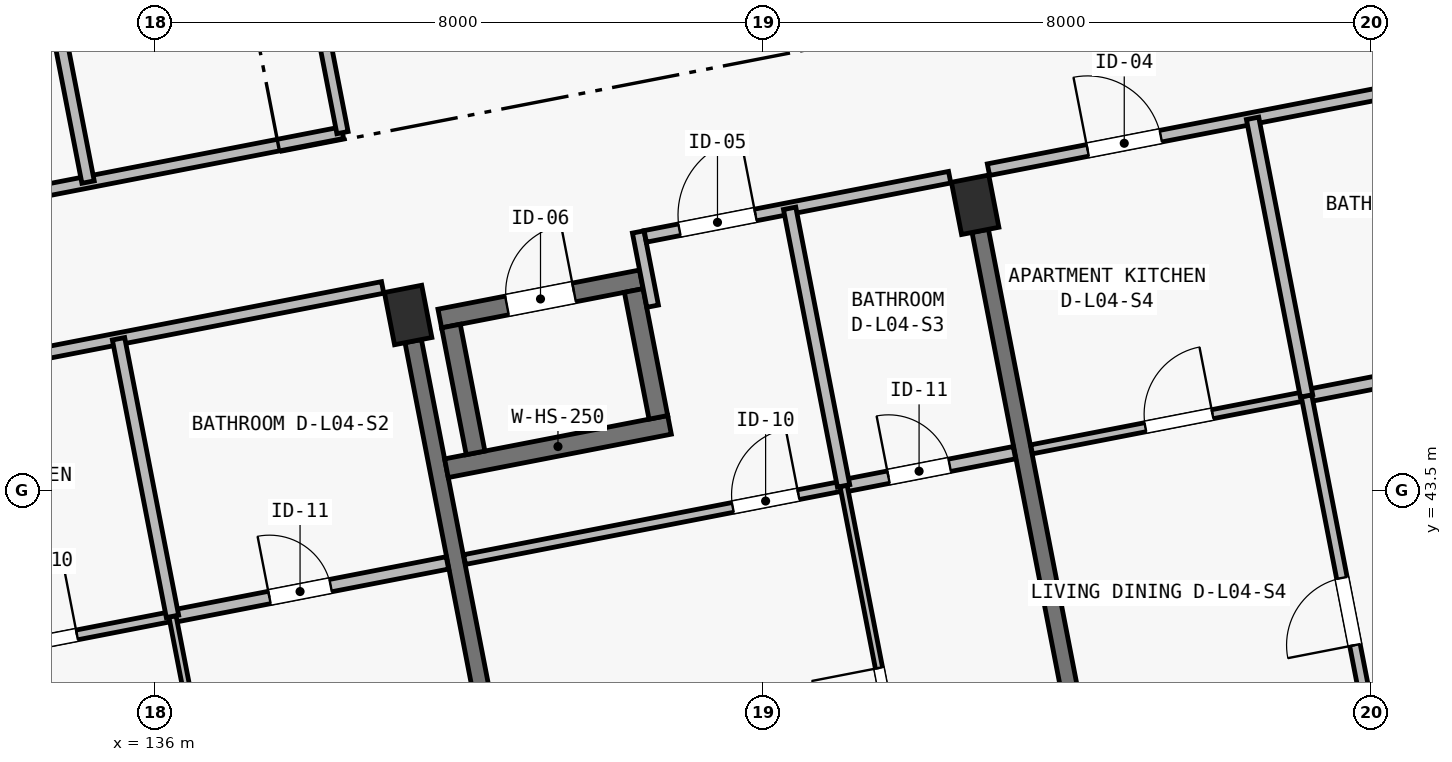
"""IFC4 building model, lengths in metres.
Left out: names, types, materials, properties, quantities, classifications, styles, units other than length and angle.
Written with IfcOpenShell. Run it as: python <this file> out.ifc"""

import sys

from ifc_helpers import new_model, si_unit, direction, frame, frame_2d, origin, origin_2d, place, context, subcontext, project, spatial, rectangle, extrude, element, fill, save


model = new_model("IFC4")
c1 = context("Model", 3, precision=1e-05, world=origin(), true_north=direction((0.0, 1.0)))
c2 = subcontext(c1, "Body", "Model", "MODEL_VIEW")
j1 = project(units=[si_unit("LENGTHUNIT", "METRE"), si_unit("PLANEANGLEUNIT", "RADIAN")], contexts=[c1])
p1 = place(None, origin())
s1 = spatial("IfcSite", under=j1, at=p1, CompositionType="ELEMENT")
p2 = place(p1, origin())
s2 = spatial("IfcBuilding", under=s1, at=p2, CompositionType="ELEMENT")
p3 = place(p2, frame((0.0, 0.0, 14.9)))
s3 = spatial("IfcBuildingStorey", under=s2, at=p3, CompositionType="ELEMENT", Elevation=14.9)
for number, where, z_axis, x_axis in (
    (1, (139.331, 45.811, 0.0), (0.0, 0.0, 1.0), (0.982, 0.191, 0.0)),
    (2, (146.791, 47.261, 0.0), (0.0, 0.0, 1.0), (0.982, 0.191, 0.0)),
):
    element("IfcColumn", number, at=place(p3, frame(where, z_axis=z_axis, x_axis=x_axis)), inside=s3, PredefinedType="COLUMN", context=c2, shape_type="SweptSolid", body=[
        extrude(rectangle(XDim=0.5, YDim=0.7, at=origin_2d()), origin(), (0.0, 0.0, 1.0), 3.25),
    ])
p4 = place(p3, frame((140.714, 38.694, 0.0), z_axis=(0.0, 0.0, 1.0), x_axis=(-0.190819465253, 0.981625148252, 0.0)))
e3 = element("IfcWall", 3, at=p4, inside=s3, PredefinedType="SHEAR", context=c2, shape_type="SweptSolid", body=[
    extrude(rectangle(XDim=6.9, YDim=0.22, at=frame_2d((3.45, 0.0))), origin(), (0.0, 0.0, 1.0), 2.5),
])
p5 = place(p3, frame((148.175, 40.144, 0.0), z_axis=(0.0, 0.0, 1.0), x_axis=(-0.190812837813, 0.981626436546, 0.0)))
e4 = element("IfcWall", 4, at=p5, inside=s3, PredefinedType="SHEAR", context=c2, shape_type="SweptSolid", body=[
    extrude(rectangle(XDim=6.9, YDim=0.22, at=frame_2d((3.45, 0.0))), origin(), (0.0, 0.0, 1.0), 2.5),
])
p6 = place(p3, frame((139.835, 43.795, 0.0), z_axis=(0.0, 0.0, 1.0), x_axis=(0.981624737535, 0.190821578075, 0.0)))
e5 = element("IfcWall", 5, at=p6, inside=s3, PredefinedType="SHEAR", context=c2, shape_type="SweptSolid", body=[
    extrude(rectangle(XDim=2.99, YDim=0.25, at=frame_2d((1.495, 0.0))), origin(), (0.0, 0.0, 1.0), 3.25),
])
p7 = place(p3, frame((139.748, 45.764, 0.0), z_axis=(0.0, 0.0, 1.0), x_axis=(0.981630445883, 0.190792210834, 0.0)))
e6 = element("IfcWall", 6, at=p7, inside=s3, PredefinedType="SHEAR", context=c2, shape_type="SweptSolid", body=[
    extrude(rectangle(XDim=2.7, YDim=0.25, at=frame_2d((1.35, 0.0))), origin(), (0.0, 0.0, 1.0), 3.25),
])
p8 = place(p7, frame((0.9, 0.0, 0.0)))
e7 = element("IfcOpeningElement", 7, at=p8, cuts=e6, PredefinedType="OPENING", context=c2, shape_type="SweptSolid", body=[
    extrude(rectangle(XDim=0.9, YDim=2.05, at=frame_2d((0.45, 1.025))), frame((0.0, 0.14, 0.0), z_axis=(0.0, -1.0, 0.0), x_axis=(1.0, 0.0, 0.0)), (0.0, 0.0, 1.0), 0.28),
])
for number, where, z_axis, x_axis in (
    (8, (140.218, 43.997, 0.0), (0.0, 0.0, 1.0), (-0.191, 0.982, 0.0)),
    (9, (142.623, 44.464, 0.0), (0.0, 0.0, 1.0), (-0.191, 0.982, 0.0)),
):
    element("IfcWall", number, at=place(p3, frame(where, z_axis=z_axis, x_axis=x_axis)), inside=s3, PredefinedType="SHEAR", context=c2, shape_type="SweptSolid", body=[
        extrude(rectangle(XDim=1.7, YDim=0.25, at=frame_2d((0.85, 0.0))), origin(), (0.0, 0.0, 1.0), 3.25),
    ])
p9 = place(p3, frame((132.046, 44.823, 0.0), z_axis=(0.0, 0.0, 1.0), x_axis=(0.9816234647, 0.190828125677, 0.0)))
e10 = element("IfcWall", 10, at=p9, inside=s3, PredefinedType="PARTITIONING", context=c2, shape_type="SweptSolid", body=[
    extrude(rectangle(XDim=7.08, YDim=0.155, at=frame_2d((3.54, 0.0))), origin(), (0.0, 0.0, 1.0), 2.97),
])
p10 = place(p9, frame((1.33, 0.0, 0.0)))
e11 = element("IfcOpeningElement", 11, at=p10, cuts=e10, PredefinedType="OPENING", context=c2, shape_type="SweptSolid", body=[
    extrude(rectangle(XDim=1.02, YDim=2.2, at=frame_2d((0.51, 1.1))), frame((0.0, 0.093, 0.0), z_axis=(0.0, -1.0, 0.0), x_axis=(1.0, 0.0, 0.0)), (0.0, 0.0, 1.0), 0.185),
])
p11 = place(p3, frame((132.613, 41.143, 0.0), z_axis=(0.0, 0.0, 1.0), x_axis=(0.981628834294, 0.190800502313, 0.0)))
e12 = element("IfcWall", 12, at=p11, inside=s3, PredefinedType="PARTITIONING", context=c2, shape_type="SweptSolid", body=[
    extrude(rectangle(XDim=3.685, YDim=0.13, at=frame_2d((1.843, 0.0))), origin(), (0.0, 0.0, 1.0), 2.97),
])
p12 = place(p11, frame((1.525, 0.0, 0.0)))
e13 = element("IfcOpeningElement", 13, at=p12, cuts=e12, PredefinedType="OPENING", context=c2, shape_type="SweptSolid", body=[
    extrude(rectangle(XDim=0.88, YDim=2.1, at=frame_2d((0.44, 1.05))), frame((0.0, 0.08, 0.0), z_axis=(0.0, -1.0, 0.0), x_axis=(1.0, 0.0, 0.0)), (0.0, 0.0, 1.0), 0.16),
])
p13 = place(p3, frame((136.23, 41.846, 0.0), z_axis=(0.0, 0.0, 1.0), x_axis=(0.981626422232, 0.190812911449, 0.0)))
e14 = element("IfcWall", 14, at=p13, inside=s3, PredefinedType="PLUMBINGWALL", context=c2, shape_type="SweptSolid", body=[
    extrude(rectangle(XDim=3.685, YDim=0.165, at=frame_2d((1.842, 0.0))), origin(), (0.0, 0.0, 1.0), 2.97),
])
p14 = place(p13, frame((1.3, 0.0, 0.0)))
e15 = element("IfcOpeningElement", 15, at=p14, cuts=e14, PredefinedType="OPENING", context=c2, shape_type="SweptSolid", body=[
    extrude(rectangle(XDim=0.82, YDim=2.08, at=frame_2d((0.41, 1.04))), frame((0.0, 0.097, 0.0), z_axis=(0.0, -1.0, 0.0), x_axis=(1.0, 0.0, 0.0)), (0.0, 0.0, 1.0), 0.195),
])
p15 = place(p3, frame((137.125, 37.242, 0.0), z_axis=(0.0, 0.0, 1.0), x_axis=(-0.190777702748, 0.981633265601, 0.0)))
e16 = element("IfcWall", 16, at=p15, inside=s3, PredefinedType="PARTITIONING", context=c2, shape_type="SweptSolid", body=[
    extrude(rectangle(XDim=4.69, YDim=0.095, at=frame_2d((2.345, 0.0))), origin(), (0.0, 0.0, 1.0), 2.97),
])
p16 = place(p15, frame((1.35, 0.0, 0.0)))
e17 = element("IfcOpeningElement", 17, at=p16, cuts=e16, PredefinedType="OPENING", context=c2, shape_type="SweptSolid", body=[
    extrude(rectangle(XDim=0.9, YDim=2.1, at=frame_2d((0.45, 1.05))), frame((0.0, 0.062, 0.0), z_axis=(0.0, -1.0, 0.0), x_axis=(1.0, 0.0, 0.0)), (0.0, 0.0, 1.0), 0.125),
])
p17 = place(p3, frame((136.23, 41.846, 0.0), z_axis=(0.0, 0.0, 1.0), x_axis=(-0.190850336204, 0.981619146701, 0.0)))
e18 = element("IfcWall", 18, at=p17, inside=s3, PredefinedType="PLUMBINGWALL", context=c2, shape_type="SweptSolid", body=[
    extrude(rectangle(XDim=3.72, YDim=0.165, at=frame_2d((1.86, 0.0))), origin(), (0.0, 0.0, 1.0), 2.97),
])
p18 = place(p3, frame((142.548, 45.927, 0.0), z_axis=(0.0, 0.0, 1.0), x_axis=(-0.190639805817, 0.981660055436, 0.0)))
e19 = element("IfcWall", 19, at=p18, inside=s3, PredefinedType="PARTITIONING", context=c2, shape_type="SweptSolid", body=[
    extrude(rectangle(XDim=0.995, YDim=0.155, at=frame_2d((0.498, 0.0))), origin(), (0.0, 0.0, 1.0), 2.97),
])
p19 = place(p3, frame((142.451, 46.845, 0.0), z_axis=(0.0, 0.0, 1.0), x_axis=(0.981636249117, 0.190762350636, 0.0)))
e20 = element("IfcWall", 20, at=p19, inside=s3, PredefinedType="PARTITIONING", context=c2, shape_type="SweptSolid", body=[
    extrude(rectangle(XDim=4.08, YDim=0.155, at=frame_2d((2.04, 0.0))), origin(), (0.0, 0.0, 1.0), 2.97),
])
p20 = place(p19, frame((0.458, 0.0, 0.0)))
e21 = element("IfcOpeningElement", 21, at=p20, cuts=e20, PredefinedType="OPENING", context=c2, shape_type="SweptSolid", body=[
    extrude(rectangle(XDim=1.02, YDim=2.2, at=frame_2d((0.51, 1.1))), frame((0.0, 0.093, 0.0), z_axis=(0.0, -1.0, 0.0), x_axis=(1.0, 0.0, 0.0)), (0.0, 0.0, 1.0), 0.185),
])
p21 = place(p3, frame((140.073, 42.594, 0.0), z_axis=(0.0, 0.0, 1.0), x_axis=(0.981629144122, 0.190798908307, 0.0)))
e22 = element("IfcWall", 22, at=p21, inside=s3, PredefinedType="PARTITIONING", context=c2, shape_type="SweptSolid", body=[
    extrude(rectangle(XDim=5.08, YDim=0.13, at=frame_2d((2.54, 0.0))), origin(), (0.0, 0.0, 1.0), 2.97),
])
p22 = place(p21, frame((3.595, 0.0, 0.0)))
e23 = element("IfcOpeningElement", 23, at=p22, cuts=e22, PredefinedType="OPENING", context=c2, shape_type="SweptSolid", body=[
    extrude(rectangle(XDim=0.88, YDim=2.1, at=frame_2d((0.44, 1.05))), frame((0.0, 0.08, 0.0), z_axis=(0.0, -1.0, 0.0), x_axis=(1.0, 0.0, 0.0)), (0.0, 0.0, 1.0), 0.16),
])
p23 = place(p3, frame((145.06, 43.563, 0.0), z_axis=(0.0, 0.0, 1.0), x_axis=(0.981624265801, 0.190824004755, 0.0)))
e24 = element("IfcWall", 24, at=p23, inside=s3, PredefinedType="PLUMBINGWALL", context=c2, shape_type="SweptSolid", body=[
    extrude(rectangle(XDim=2.29, YDim=0.165, at=frame_2d((1.145, 0.0))), origin(), (0.0, 0.0, 1.0), 2.97),
])
p24 = place(p23, frame((0.602, 0.0, 0.0)))
e25 = element("IfcOpeningElement", 25, at=p24, cuts=e24, PredefinedType="OPENING", context=c2, shape_type="SweptSolid", body=[
    extrude(rectangle(XDim=0.82, YDim=2.08, at=frame_2d((0.41, 1.04))), frame((0.0, 0.097, 0.0), z_axis=(0.0, -1.0, 0.0), x_axis=(1.0, 0.0, 0.0)), (0.0, 0.0, 1.0), 0.195),
])
p25 = place(p3, frame((145.955, 38.959, 0.0), z_axis=(0.0, 0.0, 1.0), x_axis=(-0.190837612577, 0.981621620394, 0.0)))
e26 = element("IfcWall", 26, at=p25, inside=s3, PredefinedType="PARTITIONING", context=c2, shape_type="SweptSolid", body=[
    extrude(rectangle(XDim=4.69, YDim=0.095, at=frame_2d((2.345, 0.0))), origin(), (0.0, 0.0, 1.0), 2.97),
])
p26 = place(p25, frame((1.35, 0.0, 0.0)))
e27 = element("IfcOpeningElement", 27, at=p26, cuts=e26, PredefinedType="OPENING", context=c2, shape_type="SweptSolid", body=[
    extrude(rectangle(XDim=0.9, YDim=2.1, at=frame_2d((0.45, 1.05))), frame((0.0, 0.062, 0.0), z_axis=(0.0, -1.0, 0.0), x_axis=(1.0, 0.0, 0.0)), (0.0, 0.0, 1.0), 0.125),
])
p27 = place(p3, frame((145.06, 43.563, 0.0), z_axis=(0.0, 0.0, 1.0), x_axis=(-0.190787096078, 0.981631439987, 0.0)))
e28 = element("IfcWall", 28, at=p27, inside=s3, PredefinedType="PLUMBINGWALL", context=c2, shape_type="SweptSolid", body=[
    extrude(rectangle(XDim=3.72, YDim=0.165, at=frame_2d((1.86, 0.0))), origin(), (0.0, 0.0, 1.0), 2.97),
])
p28 = place(p3, frame((146.966, 47.723, 0.0), z_axis=(0.0, 0.0, 1.0), x_axis=(0.981629923556, 0.190794898199, 0.0)))
e29 = element("IfcWall", 29, at=p28, inside=s3, PredefinedType="PARTITIONING", context=c2, shape_type="SweptSolid", body=[
    extrude(rectangle(XDim=7.08, YDim=0.155, at=frame_2d((3.54, 0.0))), origin(), (0.0, 0.0, 1.0), 2.97),
])
p29 = place(p28, frame((1.33, 0.0, 0.0)))
e30 = element("IfcOpeningElement", 30, at=p29, cuts=e29, PredefinedType="OPENING", context=c2, shape_type="SweptSolid", body=[
    extrude(rectangle(XDim=0.98, YDim=2.15, at=frame_2d((0.49, 1.075))), frame((0.0, 0.093, 0.0), z_axis=(0.0, -1.0, 0.0), x_axis=(1.0, 0.0, 0.0)), (0.0, 0.0, 1.0), 0.185),
])
p30 = place(p3, frame((147.534, 44.043, 0.0), z_axis=(0.0, 0.0, 1.0), x_axis=(0.981626422232, 0.190812911449, 0.0)))
e31 = element("IfcWall", 31, at=p30, inside=s3, PredefinedType="PARTITIONING", context=c2, shape_type="SweptSolid", body=[
    extrude(rectangle(XDim=3.685, YDim=0.12, at=frame_2d((1.842, 0.0))), origin(), (0.0, 0.0, 1.0), 2.97),
])
p31 = place(p30, frame((1.525, 0.0, 0.0)))
e32 = element("IfcOpeningElement", 32, at=p31, cuts=e31, PredefinedType="OPENING", context=c2, shape_type="SweptSolid", body=[
    extrude(rectangle(XDim=0.9, YDim=2.1, at=frame_2d((0.45, 1.05))), frame((0.0, 0.075, 0.0), z_axis=(0.0, -1.0, 0.0), x_axis=(1.0, 0.0, 0.0)), (0.0, 0.0, 1.0), 0.15),
])
p32 = place(p3, frame((151.151, 44.747, 0.0), z_axis=(0.0, 0.0, 1.0), x_axis=(0.981628834294, 0.190800502313, 0.0)))
e33 = element("IfcWall", 33, at=p32, inside=s3, PredefinedType="PLUMBINGWALL", context=c2, shape_type="SweptSolid", body=[
    extrude(rectangle(XDim=3.685, YDim=0.165, at=frame_2d((1.843, 0.0))), origin(), (0.0, 0.0, 1.0), 2.97),
])
p33 = place(p32, frame((1.3, 0.0, 0.0)))
e34 = element("IfcOpeningElement", 34, at=p33, cuts=e33, PredefinedType="OPENING", context=c2, shape_type="SweptSolid", body=[
    extrude(rectangle(XDim=0.82, YDim=2.08, at=frame_2d((0.41, 1.04))), frame((0.0, 0.097, 0.0), z_axis=(0.0, -1.0, 0.0), x_axis=(1.0, 0.0, 0.0)), (0.0, 0.0, 1.0), 0.195),
])
p34 = place(p3, frame((152.046, 40.143, 0.0), z_axis=(0.0, 0.0, 1.0), x_axis=(-0.190837612577, 0.981621620394, 0.0)))
e35 = element("IfcWall", 35, at=p34, inside=s3, PredefinedType="PARTITIONING", context=c2, shape_type="SweptSolid", body=[
    extrude(rectangle(XDim=4.69, YDim=0.14, at=frame_2d((2.345, 0.0))), origin(), (0.0, 0.0, 1.0), 2.97),
])
p35 = place(p34, frame((1.35, 0.0, 0.0)))
e36 = element("IfcOpeningElement", 36, at=p35, cuts=e35, PredefinedType="OPENING", context=c2, shape_type="SweptSolid", body=[
    extrude(rectangle(XDim=0.9, YDim=2.1, at=frame_2d((0.45, 1.05))), frame((0.0, 0.085, 0.0), z_axis=(0.0, -1.0, 0.0), x_axis=(1.0, 0.0, 0.0)), (0.0, 0.0, 1.0), 0.17),
])
p36 = place(p3, frame((151.151, 44.747, 0.0), z_axis=(0.0, 0.0, 1.0), x_axis=(-0.190774805453, 0.981633828678, 0.0)))
e37 = element("IfcWall", 37, at=p36, inside=s3, PredefinedType="PLUMBINGWALL", context=c2, shape_type="SweptSolid", body=[
    extrude(rectangle(XDim=3.72, YDim=0.165, at=frame_2d((1.86, 0.0))), origin(), (0.0, 0.0, 1.0), 2.97),
])
p37 = place(p3, frame((131.772, 46.909, 0.0), z_axis=(0.0, 0.0, 1.0), x_axis=(0.981622468528, 0.190833249935, 0.0)))
e38 = element("IfcWall", 38, at=p37, inside=s3, PredefinedType="PARTITIONING", context=c2, shape_type="SweptSolid", body=[
    extrude(rectangle(XDim=6.82, YDim=0.155, at=frame_2d((3.41, 0.0))), origin(), (0.0, 0.0, 1.0), 2.97),
])
p38 = place(p37, frame((1.205, 0.0, 0.0)))
e39 = element("IfcOpeningElement", 39, at=p38, cuts=e38, PredefinedType="OPENING", context=c2, shape_type="SweptSolid", body=[
    extrude(rectangle(XDim=0.98, YDim=2.15, at=frame_2d((0.49, 1.075))), frame((0.0, 0.093, 0.0), z_axis=(0.0, -1.0, 0.0), x_axis=(1.0, 0.0, 0.0)), (0.0, 0.0, 1.0), 0.185),
])
p39 = place(p3, frame((135.12, 47.559, 0.0), z_axis=(0.0, 0.0, 1.0), x_axis=(-0.190807031124, 0.981627565258, 0.0)))
e40 = element("IfcWall", 40, at=p39, inside=s3, PredefinedType="PLUMBINGWALL", context=c2, shape_type="SweptSolid", body=[
    extrude(rectangle(XDim=5.53, YDim=0.165, at=frame_2d((2.765, 0.0))), origin(), (0.0, 0.0, 1.0), 2.97),
])
p40 = place(p3, frame((138.467, 48.21, 0.0), z_axis=(0.0, 0.0, 1.0), x_axis=(-0.190814044018, 0.981626202078, 0.0)))
e41 = element("IfcWall", 41, at=p40, inside=s3, PredefinedType="PARTITIONING", context=c2, shape_type="SweptSolid", body=[
    extrude(rectangle(XDim=9.87, YDim=0.15, at=frame_2d((4.935, 0.0))), origin(), (0.0, 0.0, 1.0), 2.97),
])
p41 = place(p12, origin())
e42 = element("IfcDoor", 42, at=p41, inside=s3, OperationType="SINGLE_SWING_RIGHT", PredefinedType="DOOR", context=c2, shape_type="SweptSolid", body=[
    extrude(rectangle(XDim=0.88, YDim=2.1, at=frame_2d((0.44, 1.05))), frame((0.0, 0.025, 0.0), z_axis=(0.0, -1.0, 0.0), x_axis=(1.0, 0.0, 0.0)), (0.0, 0.0, 1.0), 0.05),
])
fill(e13, e42)
p42 = place(p14, origin())
e43 = element("IfcDoor", 43, at=p42, inside=s3, OperationType="SINGLE_SWING_LEFT", PredefinedType="DOOR", context=c2, shape_type="SweptSolid", body=[
    extrude(rectangle(XDim=0.82, YDim=2.08, at=frame_2d((0.41, 1.04))), frame((0.0, 0.025, 0.0), z_axis=(0.0, -1.0, 0.0), x_axis=(1.0, 0.0, 0.0)), (0.0, 0.0, 1.0), 0.05),
])
fill(e15, e43)
p43 = place(p20, origin())
e44 = element("IfcDoor", 44, at=p43, inside=s3, OperationType="SINGLE_SWING_RIGHT", PredefinedType="DOOR", context=c2, shape_type="SweptSolid", body=[
    extrude(rectangle(XDim=1.02, YDim=2.2, at=frame_2d((0.51, 1.1))), frame((0.0, 0.025, 0.0), z_axis=(0.0, -1.0, 0.0), x_axis=(1.0, 0.0, 0.0)), (0.0, 0.0, 1.0), 0.05),
])
fill(e21, e44)
p44 = place(p22, origin())
e45 = element("IfcDoor", 45, at=p44, inside=s3, OperationType="SINGLE_SWING_RIGHT", PredefinedType="DOOR", context=c2, shape_type="SweptSolid", body=[
    extrude(rectangle(XDim=0.88, YDim=2.1, at=frame_2d((0.44, 1.05))), frame((0.0, 0.025, 0.0), z_axis=(0.0, -1.0, 0.0), x_axis=(1.0, 0.0, 0.0)), (0.0, 0.0, 1.0), 0.05),
])
fill(e23, e45)
p45 = place(p24, origin())
e46 = element("IfcDoor", 46, at=p45, inside=s3, OperationType="SINGLE_SWING_LEFT", PredefinedType="DOOR", context=c2, shape_type="SweptSolid", body=[
    extrude(rectangle(XDim=0.82, YDim=2.08, at=frame_2d((0.41, 1.04))), frame((0.0, 0.025, 0.0), z_axis=(0.0, -1.0, 0.0), x_axis=(1.0, 0.0, 0.0)), (0.0, 0.0, 1.0), 0.05),
])
fill(e25, e46)
p46 = place(p26, origin())
e47 = element("IfcDoor", 47, at=p46, inside=s3, OperationType="SINGLE_SWING_RIGHT", PredefinedType="DOOR", context=c2, shape_type="SweptSolid", body=[
    extrude(rectangle(XDim=0.9, YDim=2.1, at=frame_2d((0.45, 1.05))), frame((0.0, 0.025, 0.0), z_axis=(0.0, -1.0, 0.0), x_axis=(1.0, 0.0, 0.0)), (0.0, 0.0, 1.0), 0.05),
])
fill(e27, e47)
p47 = place(p29, origin())
e48 = element("IfcDoor", 48, at=p47, inside=s3, OperationType="SINGLE_SWING_LEFT", PredefinedType="DOOR", context=c2, shape_type="SweptSolid", body=[
    extrude(rectangle(XDim=0.98, YDim=2.15, at=frame_2d((0.49, 1.075))), frame((0.0, 0.025, 0.0), z_axis=(0.0, -1.0, 0.0), x_axis=(1.0, 0.0, 0.0)), (0.0, 0.0, 1.0), 0.05),
])
fill(e30, e48)
p48 = place(p31, origin())
e49 = element("IfcDoor", 49, at=p48, inside=s3, OperationType="SINGLE_SWING_RIGHT", PredefinedType="DOOR", context=c2, shape_type="SweptSolid", body=[
    extrude(rectangle(XDim=0.9, YDim=2.1, at=frame_2d((0.45, 1.05))), frame((0.0, 0.025, 0.0), z_axis=(0.0, -1.0, 0.0), x_axis=(1.0, 0.0, 0.0)), (0.0, 0.0, 1.0), 0.05),
])
fill(e32, e49)
p49 = place(p35, origin())
e50 = element("IfcDoor", 50, at=p49, inside=s3, OperationType="SINGLE_SWING_LEFT", PredefinedType="DOOR", context=c2, shape_type="SweptSolid", body=[
    extrude(rectangle(XDim=0.9, YDim=2.1, at=frame_2d((0.45, 1.05))), frame((0.0, 0.025, 0.0), z_axis=(0.0, -1.0, 0.0), x_axis=(1.0, 0.0, 0.0)), (0.0, 0.0, 1.0), 0.05),
])
fill(e36, e50)
p50 = place(p8, origin())
e51 = element("IfcDoor", 51, at=p50, inside=s3, OperationType="SINGLE_SWING_RIGHT", PredefinedType="DOOR", context=c2, shape_type="SweptSolid", body=[
    extrude(rectangle(XDim=0.9, YDim=2.05, at=frame_2d((0.45, 1.025))), frame((0.0, 0.025, 0.0), z_axis=(0.0, -1.0, 0.0), x_axis=(1.0, 0.0, 0.0)), (0.0, 0.0, 1.0), 0.05),
])
fill(e7, e51)
save(model, sys.argv[1])
